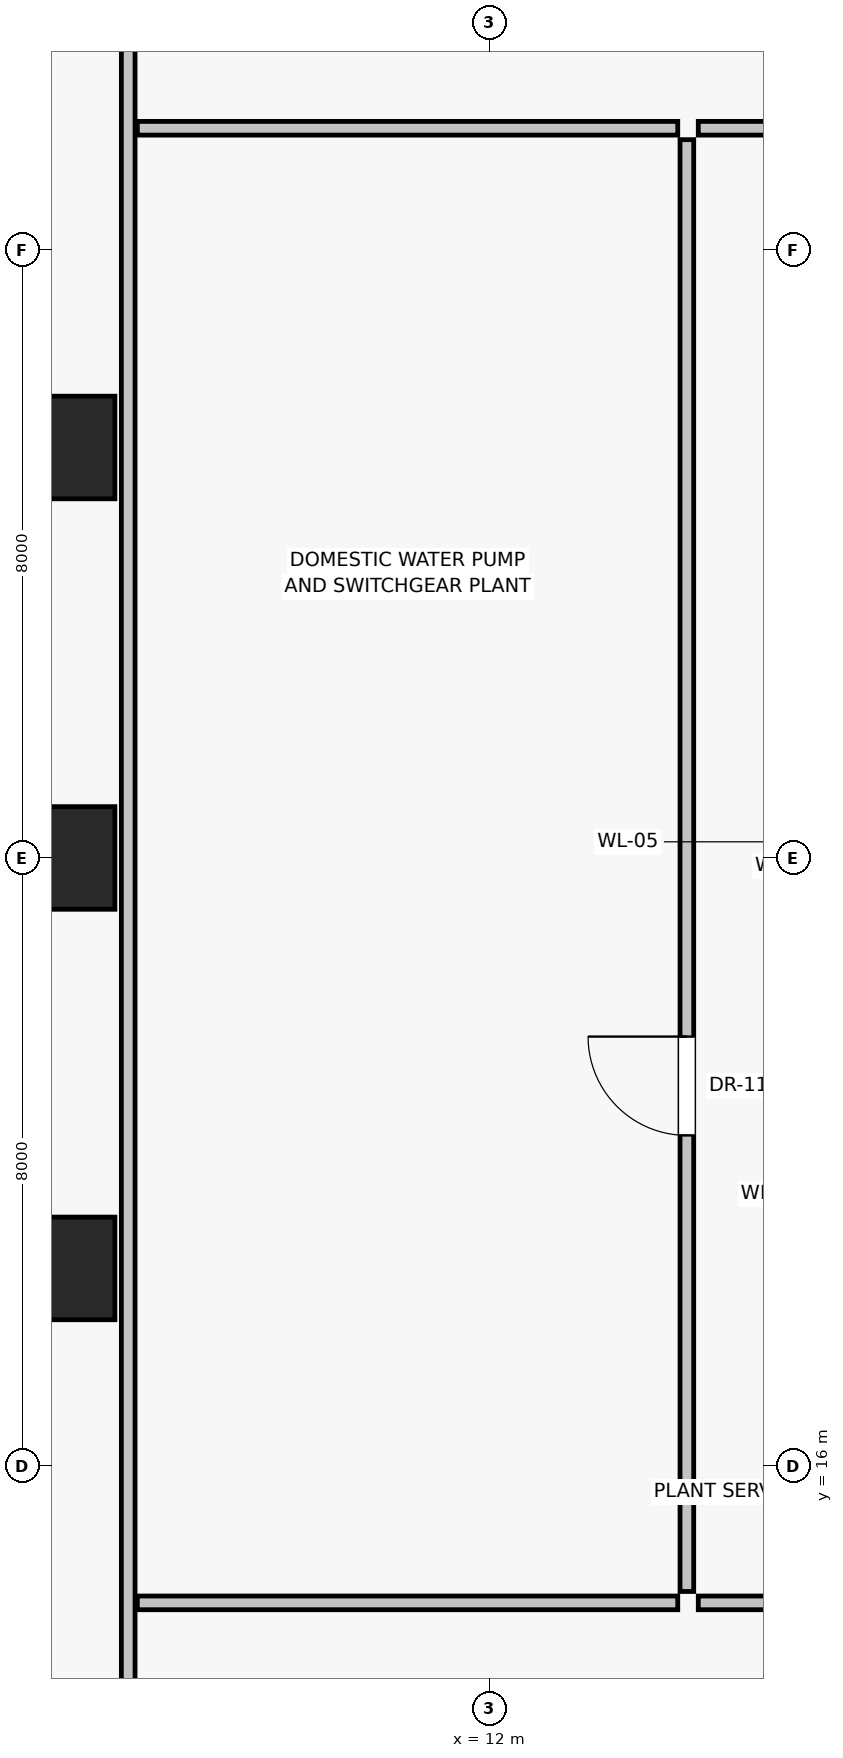
"""IFC4 building model, lengths in metres.
Left out: names, types, materials, properties, quantities, classifications, styles, units other than length and angle.
Written with IfcOpenShell. Run it as: python <this file> out.ifc"""

import sys

from ifc_helpers import new_model, si_unit, direction, frame, frame_2d, origin, origin_2d, place, context, subcontext, project, spatial, rectangle, extrude, source, transform, mapped, element, fill, save


model = new_model("IFC4")
c1 = context("Model", 3, precision=1e-05, world=origin(), true_north=direction((0.0, 1.0)))
c2 = subcontext(c1, "Body", "Model", "MODEL_VIEW")
j1 = project(units=[si_unit("LENGTHUNIT", "METRE"), si_unit("PLANEANGLEUNIT", "RADIAN")], contexts=[c1])
p1 = place(None, origin())
s1 = spatial("IfcSite", under=j1, at=p1, CompositionType="ELEMENT")
p2 = place(p1, origin())
s2 = spatial("IfcBuilding", under=s1, at=p2, CompositionType="ELEMENT")
p3 = place(p2, frame((0.0, 0.0, 80.35)))
s3 = spatial("IfcBuildingStorey", under=s2, at=p3, CompositionType="ELEMENT", Elevation=80.35)
for number, where, z_axis, x_axis in (
    (1, (6.4, 29.4, 0.0), (0.0, 0.0, 1.0), (1.0, 0.0, 0.0)),
    (2, (6.4, 24.0, 0.0), (0.0, 0.0, 1.0), (1.0, 0.0, 0.0)),
    (3, (6.4, 18.6, 0.0), (0.0, 0.0, 1.0), (1.0, 0.0, 0.0)),
):
    element("IfcColumn", number, at=place(p3, frame(where, z_axis=z_axis, x_axis=x_axis)), inside=s3, PredefinedType="COLUMN", context=c2, shape_type="SweptSolid", body=[
        extrude(rectangle(XDim=1.35, YDim=1.35, at=origin_2d()), origin(), (0.0, 0.0, 1.0), 4.8),
    ])
p4 = place(p3, frame((14.75, 14.2, 0.0), z_axis=(0.0, 0.0, 1.0), x_axis=(1.0, 0.0, 0.0)))
e4 = element("IfcWall", 4, at=p4, inside=s3, PredefinedType="PARTITIONING", context=c2, shape_type="SweptSolid", body=[
    extrude(rectangle(XDim=18.5, YDim=0.18, at=frame_2d((9.25, 0.0))), origin(), (0.0, 0.0, 1.0), 4.48),
])
p5 = place(p4, frame((6.0, 0.0, 0.0)))
e5 = element("IfcOpeningElement", 5, at=p5, cuts=e4, PredefinedType="OPENING", context=c2, shape_type="SweptSolid", body=[
    extrude(rectangle(XDim=1.1, YDim=2.03, at=frame_2d((0.55, 1.015))), frame((0.0, 0.1, 0.0), z_axis=(0.0, -1.0, 0.0), x_axis=(1.0, 0.0, 0.0)), (0.0, 0.0, 1.0), 0.2),
])
p6 = place(p3, frame((14.75, 33.6, 0.0), z_axis=(0.0, 0.0, 1.0), x_axis=(1.0, 0.0, 0.0)))
e6 = element("IfcWall", 6, at=p6, inside=s3, PredefinedType="PARTITIONING", context=c2, shape_type="SweptSolid", body=[
    extrude(rectangle(XDim=18.5, YDim=0.18, at=frame_2d((9.25, 0.0))), origin(), (0.0, 0.0, 1.0), 4.48),
])
p7 = place(p6, frame((6.0, 0.0, 0.0)))
e7 = element("IfcOpeningElement", 7, at=p7, cuts=e6, PredefinedType="OPENING", context=c2, shape_type="SweptSolid", body=[
    extrude(rectangle(XDim=1.1, YDim=2.03, at=frame_2d((0.55, 1.015))), frame((0.0, 0.1, 0.0), z_axis=(0.0, -1.0, 0.0), x_axis=(1.0, 0.0, 0.0)), (0.0, 0.0, 1.0), 0.2),
])
p8 = place(p3, frame((14.6, 14.35, 0.0), z_axis=(0.0, 0.0, 1.0), x_axis=(0.0, 1.0, 0.0)))
e8 = element("IfcWall", 8, at=p8, inside=s3, PredefinedType="PARTITIONING", context=c2, shape_type="SweptSolid", body=[
    extrude(rectangle(XDim=19.1, YDim=0.18, at=frame_2d((9.55, 0.0))), origin(), (0.0, 0.0, 1.0), 4.48),
])
p9 = place(p8, frame((6.0, 0.0, 0.0)))
e9 = element("IfcOpeningElement", 9, at=p9, cuts=e8, PredefinedType="OPENING", context=c2, shape_type="SweptSolid", body=[
    extrude(rectangle(XDim=1.3, YDim=2.3, at=frame_2d((0.65, 1.15))), frame((0.0, 0.1, 0.0), z_axis=(0.0, -1.0, 0.0), x_axis=(1.0, 0.0, 0.0)), (0.0, 0.0, 1.0), 0.2),
])
p10 = place(p3, frame((7.25, 7.37, 0.0), z_axis=(0.0, 0.0, 1.0), x_axis=(0.0, 1.0, 0.0)))
e10 = element("IfcWall", 10, at=p10, inside=s3, PredefinedType="PARTITIONING", context=c2, shape_type="SweptSolid", body=[
    extrude(rectangle(XDim=33.26, YDim=0.18, at=frame_2d((16.63, 0.0))), origin(), (0.0, 0.0, 1.0), 2.28),
])
for number, where, z_axis, x_axis in (
    (11, (7.37, 14.2, 0.0), (0.0, 0.0, 1.0), (1.0, 0.0, 0.0)),
    (12, (7.37, 33.6, 0.0), (0.0, 0.0, 1.0), (1.0, 0.0, 0.0)),
):
    element("IfcWall", number, at=place(p3, frame(where, z_axis=z_axis, x_axis=x_axis)), inside=s3, PredefinedType="PARTITIONING", context=c2, shape_type="SweptSolid", body=[
        extrude(rectangle(XDim=7.11, YDim=0.18, at=frame_2d((3.555, 0.0))), origin(), (0.0, 0.0, 1.0), 4.48),
    ])
m1 = source(origin(), c2, "Body", "SweptSolid", [
    extrude(rectangle(XDim=1.3, YDim=2.3, at=frame_2d((0.65, 1.15))), frame((0.0, 0.025, 0.0), z_axis=(0.0, -1.0, 0.0), x_axis=(1.0, 0.0, 0.0)), (0.0, 0.0, 1.0), 0.05),
])
p11 = place(p9, origin())
e13 = element("IfcDoor", 13, at=p11, inside=s3, OperationType="SINGLE_SWING_RIGHT", PredefinedType="DOOR", context=c2, shape_type="MappedRepresentation", body=[
    mapped(m1, transform((0.0, 0.0, 0.0), scale=1.0)),
])
fill(e9, e13)
save(model, sys.argv[1])
